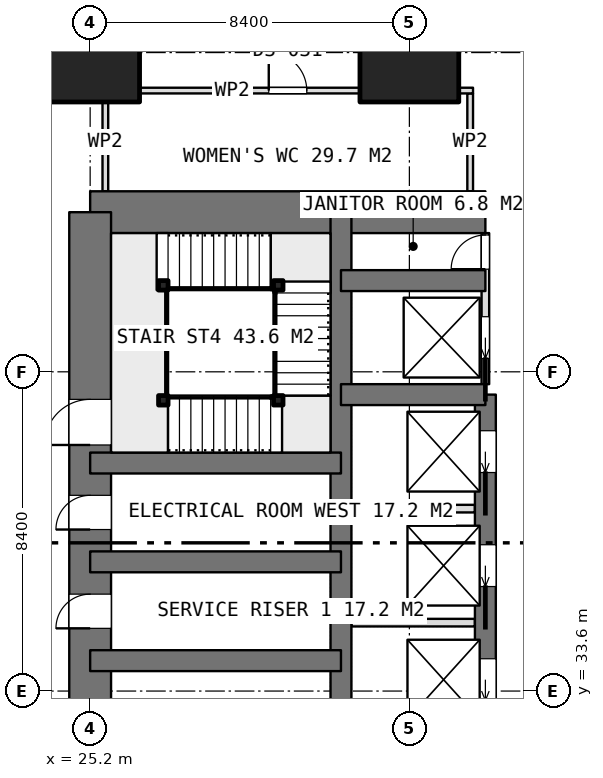
"""IFC4 building model, lengths in metres.
Left out: names, types, materials, properties, quantities, classifications, styles, units other than length and angle.
Written with IfcOpenShell. Run it as: python <this file> out.ifc"""

import sys

from ifc_helpers import new_model, si_unit, direction, frame, frame_2d, origin, origin_2d, place, context, subcontext, project, spatial, rectangle, extrude, element, fill, save


model = new_model("IFC4")
c1 = context("Model", 3, precision=1e-05, world=origin(), true_north=direction((0.0, 1.0)))
c2 = subcontext(c1, "Body", "Model", "MODEL_VIEW")
j1 = project(units=[si_unit("LENGTHUNIT", "METRE"), si_unit("PLANEANGLEUNIT", "RADIAN")], contexts=[c1])
p1 = place(None, origin())
s1 = spatial("IfcSite", under=j1, at=p1, CompositionType="ELEMENT")
p2 = place(p1, origin())
s2 = spatial("IfcBuilding", under=s1, at=p2, CompositionType="ELEMENT")
p3 = place(p2, frame((0.0, 0.0, 25.4)))
s3 = spatial("IfcBuildingStorey", under=s2, at=p3, CompositionType="ELEMENT", Elevation=25.4)
p4 = place(p3, frame((25.2, 46.2, 0.0), z_axis=(0.0, 0.0, 1.0), x_axis=(1.0, 0.0, 0.0)))
e1 = element("IfcWall", 1, at=p4, inside=s3, PredefinedType="SHEAR", context=c2, shape_type="SweptSolid", body=[
    extrude(rectangle(XDim=10.4, YDim=1.1, at=frame_2d((5.2, 0.0))), origin(), (0.0, 0.0, 1.0), 3.75),
])
p5 = place(p3, frame((25.2, 21.0, 0.0), z_axis=(0.0, 0.0, 1.0), x_axis=(0.0, 1.0, 0.0)))
e2 = element("IfcWall", 2, at=p5, inside=s3, PredefinedType="SHEAR", context=c2, shape_type="SweptSolid", body=[
    extrude(rectangle(XDim=25.2, YDim=1.1, at=frame_2d((12.6, 0.0))), origin(), (0.0, 0.0, 1.0), 3.75),
])
p6 = place(p5, frame((7.8, 0.0, 0.0)))
e3 = element("IfcOpeningElement", 3, at=p6, cuts=e2, PredefinedType="OPENING", context=c2, shape_type="SweptSolid", body=[
    extrude(rectangle(XDim=1.2, YDim=2.1, at=frame_2d((0.6, 1.05))), frame((0.0, 0.56, 0.0), z_axis=(0.0, -1.0, 0.0), x_axis=(1.0, 0.0, 0.0)), (0.0, 0.0, 1.0), 1.12),
])
p7 = place(p5, frame((14.25, 0.0, 0.0)))
e4 = element("IfcOpeningElement", 4, at=p7, cuts=e2, PredefinedType="OPENING", context=c2, shape_type="SweptSolid", body=[
    extrude(rectangle(XDim=0.9, YDim=2.1, at=frame_2d((0.45, 1.05))), frame((0.0, 0.56, 0.0), z_axis=(0.0, -1.0, 0.0), x_axis=(1.0, 0.0, 0.0)), (0.0, 0.0, 1.0), 1.12),
])
p8 = place(p5, frame((16.85, 0.0, 0.0)))
e5 = element("IfcOpeningElement", 5, at=p8, cuts=e2, PredefinedType="OPENING", context=c2, shape_type="SweptSolid", body=[
    extrude(rectangle(XDim=0.9, YDim=2.1, at=frame_2d((0.45, 1.05))), frame((0.0, 0.56, 0.0), z_axis=(0.0, -1.0, 0.0), x_axis=(1.0, 0.0, 0.0)), (0.0, 0.0, 1.0), 1.12),
])
p9 = place(p5, frame((19.075, 0.0, 0.0)))
e6 = element("IfcOpeningElement", 6, at=p9, cuts=e2, PredefinedType="OPENING", context=c2, shape_type="SweptSolid", body=[
    extrude(rectangle(XDim=1.2, YDim=2.1, at=frame_2d((0.6, 1.05))), frame((0.0, 0.56, 0.0), z_axis=(0.0, -1.0, 0.0), x_axis=(1.0, 0.0, 0.0)), (0.0, 0.0, 1.0), 1.12),
])
p10 = place(p3, frame((31.8, 21.0, 0.0), z_axis=(0.0, 0.0, 1.0), x_axis=(0.0, 1.0, 0.0)))
e7 = element("IfcWall", 7, at=p10, inside=s3, PredefinedType="SHEAR", context=c2, shape_type="SweptSolid", body=[
    extrude(rectangle(XDim=25.2, YDim=0.55, at=frame_2d((12.6, 0.0))), origin(), (0.0, 0.0, 1.0), 3.75),
])
p11 = place(p3, frame((35.6, 23.4, 0.0), z_axis=(0.0, 0.0, 1.0), x_axis=(0.0, 1.0, 0.0)))
e8 = element("IfcWall", 8, at=p11, inside=s3, PredefinedType="SHEAR", context=c2, shape_type="SweptSolid", body=[
    extrude(rectangle(XDim=18.0, YDim=0.55, at=frame_2d((9.0, 0.0))), origin(), (0.0, 0.0, 1.0), 3.75),
])
p12 = place(p11, frame((0.95, 0.0, 0.0)))
e9 = element("IfcOpeningElement", 9, at=p12, cuts=e8, PredefinedType="OPENING", context=c2, shape_type="SweptSolid", body=[
    extrude(rectangle(XDim=1.1, YDim=2.1, at=frame_2d((0.55, 1.05))), frame((0.0, 0.285, 0.0), z_axis=(0.0, -1.0, 0.0), x_axis=(1.0, 0.0, 0.0)), (0.0, 0.0, 1.0), 0.57),
])
p13 = place(p11, frame((3.95, 0.0, 0.0)))
e10 = element("IfcOpeningElement", 10, at=p13, cuts=e8, PredefinedType="OPENING", context=c2, shape_type="SweptSolid", body=[
    extrude(rectangle(XDim=1.1, YDim=2.1, at=frame_2d((0.55, 1.05))), frame((0.0, 0.285, 0.0), z_axis=(0.0, -1.0, 0.0), x_axis=(1.0, 0.0, 0.0)), (0.0, 0.0, 1.0), 0.57),
])
p14 = place(p11, frame((6.95, 0.0, 0.0)))
e11 = element("IfcOpeningElement", 11, at=p14, cuts=e8, PredefinedType="OPENING", context=c2, shape_type="SweptSolid", body=[
    extrude(rectangle(XDim=1.1, YDim=2.1, at=frame_2d((0.55, 1.05))), frame((0.0, 0.285, 0.0), z_axis=(0.0, -1.0, 0.0), x_axis=(1.0, 0.0, 0.0)), (0.0, 0.0, 1.0), 0.57),
])
p15 = place(p11, frame((9.95, 0.0, 0.0)))
e12 = element("IfcOpeningElement", 12, at=p15, cuts=e8, PredefinedType="OPENING", context=c2, shape_type="SweptSolid", body=[
    extrude(rectangle(XDim=1.1, YDim=2.1, at=frame_2d((0.55, 1.05))), frame((0.0, 0.285, 0.0), z_axis=(0.0, -1.0, 0.0), x_axis=(1.0, 0.0, 0.0)), (0.0, 0.0, 1.0), 0.57),
])
p16 = place(p11, frame((12.95, 0.0, 0.0)))
e13 = element("IfcOpeningElement", 13, at=p16, cuts=e8, PredefinedType="OPENING", context=c2, shape_type="SweptSolid", body=[
    extrude(rectangle(XDim=1.1, YDim=2.1, at=frame_2d((0.55, 1.05))), frame((0.0, 0.285, 0.0), z_axis=(0.0, -1.0, 0.0), x_axis=(1.0, 0.0, 0.0)), (0.0, 0.0, 1.0), 0.57),
])
p17 = place(p11, frame((15.95, 0.0, 0.0)))
e14 = element("IfcOpeningElement", 14, at=p17, cuts=e8, PredefinedType="OPENING", context=c2, shape_type="SweptSolid", body=[
    extrude(rectangle(XDim=1.1, YDim=2.1, at=frame_2d((0.55, 1.05))), frame((0.0, 0.285, 0.0), z_axis=(0.0, -1.0, 0.0), x_axis=(1.0, 0.0, 0.0)), (0.0, 0.0, 1.0), 0.57),
])
for number, where, z_axis, x_axis in (
    (15, (31.8, 41.4, 0.0), (0.0, 0.0, 1.0), (1.0, 0.0, 0.0)),
    (16, (31.8, 44.4, 0.0), (0.0, 0.0, 1.0), (1.0, 0.0, 0.0)),
):
    element("IfcWall", number, at=place(p3, frame(where, z_axis=z_axis, x_axis=x_axis)), inside=s3, PredefinedType="SHEAR", context=c2, shape_type="SweptSolid", body=[
        extrude(rectangle(XDim=3.8, YDim=0.55, at=frame_2d((1.9, 0.0))), origin(), (0.0, 0.0, 1.0), 3.75),
    ])
for number, where, z_axis, x_axis in (
    (17, (25.2, 34.4, 0.0), (0.0, 0.0, 1.0), (1.0, 0.0, 0.0)),
    (18, (25.2, 37.0, 0.0), (0.0, 0.0, 1.0), (1.0, 0.0, 0.0)),
    (19, (25.2, 39.6, 0.0), (0.0, 0.0, 1.0), (1.0, 0.0, 0.0)),
):
    element("IfcWall", number, at=place(p3, frame(where, z_axis=z_axis, x_axis=x_axis)), inside=s3, PredefinedType="SHEAR", context=c2, shape_type="SweptSolid", body=[
        extrude(rectangle(XDim=6.6, YDim=0.55, at=frame_2d((3.3, 0.0))), origin(), (0.0, 0.0, 1.0), 3.75),
    ])
for number, where, z_axis, x_axis in (
    (20, (25.2, 50.4, 0.0), (0.0, 0.0, 1.0), (1.0, 0.0, 0.0)),
    (21, (33.6, 50.4, 0.0), (0.0, 0.0, 1.0), (1.0, 0.0, 0.0)),
):
    element("IfcColumn", number, at=place(p3, frame(where, z_axis=z_axis, x_axis=x_axis)), inside=s3, PredefinedType="COLUMN", context=c2, shape_type="SweptSolid", body=[
        extrude(rectangle(XDim=2.6, YDim=2.6, at=origin_2d()), origin(), (0.0, 0.0, 1.0), 3.75),
    ])
for number, where, z_axis, x_axis in (
    (22, (32.075, 35.4, 0.0), (0.0, 0.0, 1.0), (1.0, 0.0, 0.0)),
    (23, (32.075, 38.4, 0.0), (0.0, 0.0, 1.0), (1.0, 0.0, 0.0)),
):
    element("IfcWall", number, at=place(p3, frame(where, z_axis=z_axis, x_axis=x_axis)), inside=s3, PredefinedType="PARTITIONING", context=c2, shape_type="SweptSolid", body=[
        extrude(rectangle(XDim=3.25, YDim=0.2, at=frame_2d((1.625, 0.0))), origin(), (0.0, 0.0, 1.0), 3.5),
    ])
p18 = place(p3, frame((35.6, 41.675, 0.0), z_axis=(0.0, 0.0, 1.0), x_axis=(0.0, 1.0, 0.0)))
e24 = element("IfcWall", 24, at=p18, inside=s3, PredefinedType="PARTITIONING", context=c2, shape_type="SweptSolid", body=[
    extrude(rectangle(XDim=3.975, YDim=0.2, at=frame_2d((1.987, 0.0))), origin(), (0.0, 0.0, 1.0), 3.5),
])
p19 = place(p18, frame((3.025, 0.0, 0.0)))
e25 = element("IfcOpeningElement", 25, at=p19, cuts=e24, PredefinedType="OPENING", context=c2, shape_type="SweptSolid", body=[
    extrude(rectangle(XDim=0.9, YDim=2.1, at=frame_2d((0.45, 1.05))), frame((0.0, 0.11, 0.0), z_axis=(0.0, -1.0, 0.0), x_axis=(1.0, 0.0, 0.0)), (0.0, 0.0, 1.0), 0.22),
])
p20 = place(p18, frame((0.675, 0.0, 0.0)))
e26 = element("IfcOpeningElement", 26, at=p20, cuts=e24, PredefinedType="OPENING", context=c2, shape_type="SweptSolid", body=[
    extrude(rectangle(XDim=1.1, YDim=2.1, at=frame_2d((0.55, 1.05))), frame((0.0, 0.11, 0.0), z_axis=(0.0, -1.0, 0.0), x_axis=(1.0, 0.0, 0.0)), (0.0, 0.0, 1.0), 0.22),
])
p21 = place(p3, frame((25.525, 49.4, 0.0), z_axis=(0.0, 0.0, 1.0), x_axis=(1.0, 0.0, 0.0)))
e27 = element("IfcWall", 27, at=p21, inside=s3, PredefinedType="PARTITIONING", context=c2, shape_type="SweptSolid", body=[
    extrude(rectangle(XDim=9.75, YDim=0.15, at=frame_2d((4.875, 0.0))), origin(), (0.0, 0.0, 1.0), 3.5),
])
p22 = place(p21, frame((4.375, 0.0, 0.0)))
e28 = element("IfcOpeningElement", 28, at=p22, cuts=e27, PredefinedType="OPENING", context=c2, shape_type="SweptSolid", body=[
    extrude(rectangle(XDim=1.0, YDim=2.1, at=frame_2d((0.5, 1.05))), frame((0.0, 0.085, 0.0), z_axis=(0.0, -1.0, 0.0), x_axis=(1.0, 0.0, 0.0)), (0.0, 0.0, 1.0), 0.17),
])
for number, where, z_axis, x_axis in (
    (29, (25.6, 46.75, 0.0), (0.0, 0.0, 1.0), (0.0, 1.0, 0.0)),
    (30, (35.2, 46.75, 0.0), (0.0, 0.0, 1.0), (0.0, 1.0, 0.0)),
):
    element("IfcWall", number, at=place(p3, frame(where, z_axis=z_axis, x_axis=x_axis)), inside=s3, PredefinedType="PARTITIONING", context=c2, shape_type="SweptSolid", body=[
        extrude(rectangle(XDim=2.575, YDim=0.15, at=frame_2d((1.288, 0.0))), origin(), (0.0, 0.0, 1.0), 3.5),
    ])
for number, where, z_axis, x_axis in (
    (31, (27.125, 41.25, 0.0), (0.0, 0.0, 1.0), (1.0, 0.0, 0.0)),
    (32, (30.15, 41.25, 0.0), (0.0, 0.0, 1.0), (1.0, 0.0, 0.0)),
    (33, (30.15, 44.275, 0.0), (0.0, 0.0, 1.0), (1.0, 0.0, 0.0)),
    (34, (27.125, 44.275, 0.0), (0.0, 0.0, 1.0), (1.0, 0.0, 0.0)),
):
    element("IfcColumn", number, at=place(p3, frame(where, z_axis=z_axis, x_axis=x_axis)), inside=s3, PredefinedType="COLUMN", context=c2, shape_type="SweptSolid", body=[
        extrude(rectangle(XDim=0.25, YDim=0.25, at=origin_2d()), origin(), (0.0, 0.0, 1.0), 3.75),
    ])
p23 = place(p7, origin())
e35 = element("IfcDoor", 35, at=p23, inside=s3, OperationType="SINGLE_SWING_LEFT", PredefinedType="DOOR", context=c2, shape_type="SweptSolid", body=[
    extrude(rectangle(XDim=0.9, YDim=2.1, at=frame_2d((0.45, 1.05))), frame((0.0, 0.025, 0.0), z_axis=(0.0, -1.0, 0.0), x_axis=(1.0, 0.0, 0.0)), (0.0, 0.0, 1.0), 0.05),
])
fill(e4, e35)
p24 = place(p8, origin())
e36 = element("IfcDoor", 36, at=p24, inside=s3, OperationType="SINGLE_SWING_LEFT", PredefinedType="DOOR", context=c2, shape_type="SweptSolid", body=[
    extrude(rectangle(XDim=0.9, YDim=2.1, at=frame_2d((0.45, 1.05))), frame((0.0, 0.025, 0.0), z_axis=(0.0, -1.0, 0.0), x_axis=(1.0, 0.0, 0.0)), (0.0, 0.0, 1.0), 0.05),
])
fill(e5, e36)
p25 = place(p19, origin())
e37 = element("IfcDoor", 37, at=p25, inside=s3, OperationType="SINGLE_SWING_LEFT", PredefinedType="DOOR", context=c2, shape_type="SweptSolid", body=[
    extrude(rectangle(XDim=0.9, YDim=2.1, at=frame_2d((0.45, 1.05))), frame((0.0, 0.025, 0.0), z_axis=(0.0, -1.0, 0.0), x_axis=(1.0, 0.0, 0.0)), (0.0, 0.0, 1.0), 0.05),
])
fill(e25, e37)
p26 = place(p15, origin())
e38 = element("IfcDoor", 38, at=p26, inside=s3, OperationType="SLIDING_TO_LEFT", PredefinedType="USERDEFINED", context=c2, shape_type="SweptSolid", body=[
    extrude(rectangle(XDim=1.1, YDim=2.1, at=frame_2d((0.55, 1.05))), frame((0.0, 0.025, 0.0), z_axis=(0.0, -1.0, 0.0), x_axis=(1.0, 0.0, 0.0)), (0.0, 0.0, 1.0), 0.05),
])
fill(e12, e38)
p27 = place(p16, origin())
e39 = element("IfcDoor", 39, at=p27, inside=s3, OperationType="SLIDING_TO_LEFT", PredefinedType="USERDEFINED", context=c2, shape_type="SweptSolid", body=[
    extrude(rectangle(XDim=1.1, YDim=2.1, at=frame_2d((0.55, 1.05))), frame((0.0, 0.025, 0.0), z_axis=(0.0, -1.0, 0.0), x_axis=(1.0, 0.0, 0.0)), (0.0, 0.0, 1.0), 0.05),
])
fill(e13, e39)
p28 = place(p17, origin())
e40 = element("IfcDoor", 40, at=p28, inside=s3, OperationType="SLIDING_TO_LEFT", PredefinedType="USERDEFINED", context=c2, shape_type="SweptSolid", body=[
    extrude(rectangle(XDim=1.1, YDim=2.1, at=frame_2d((0.55, 1.05))), frame((0.0, 0.025, 0.0), z_axis=(0.0, -1.0, 0.0), x_axis=(1.0, 0.0, 0.0)), (0.0, 0.0, 1.0), 0.05),
])
fill(e14, e40)
p29 = place(p20, origin())
e41 = element("IfcDoor", 41, at=p29, inside=s3, OperationType="SLIDING_TO_LEFT", PredefinedType="USERDEFINED", context=c2, shape_type="SweptSolid", body=[
    extrude(rectangle(XDim=1.1, YDim=2.1, at=frame_2d((0.55, 1.05))), frame((0.0, 0.025, 0.0), z_axis=(0.0, -1.0, 0.0), x_axis=(1.0, 0.0, 0.0)), (0.0, 0.0, 1.0), 0.05),
])
fill(e26, e41)
p30 = place(p22, origin())
e42 = element("IfcDoor", 42, at=p30, inside=s3, OperationType="SINGLE_SWING_LEFT", PredefinedType="DOOR", context=c2, shape_type="SweptSolid", body=[
    extrude(rectangle(XDim=1.0, YDim=2.1, at=frame_2d((0.5, 1.05))), frame((0.0, 0.025, 0.0), z_axis=(0.0, -1.0, 0.0), x_axis=(1.0, 0.0, 0.0)), (0.0, 0.0, 1.0), 0.05),
])
fill(e28, e42)
p31 = place(p9, origin())
e43 = element("IfcDoor", 43, at=p31, inside=s3, OperationType="SINGLE_SWING_RIGHT", PredefinedType="DOOR", context=c2, shape_type="SweptSolid", body=[
    extrude(rectangle(XDim=1.2, YDim=2.1, at=frame_2d((0.6, 1.05))), frame((0.0, 0.025, 0.0), z_axis=(0.0, -1.0, 0.0), x_axis=(1.0, 0.0, 0.0)), (0.0, 0.0, 1.0), 0.05),
])
fill(e6, e43)
save(model, sys.argv[1])
